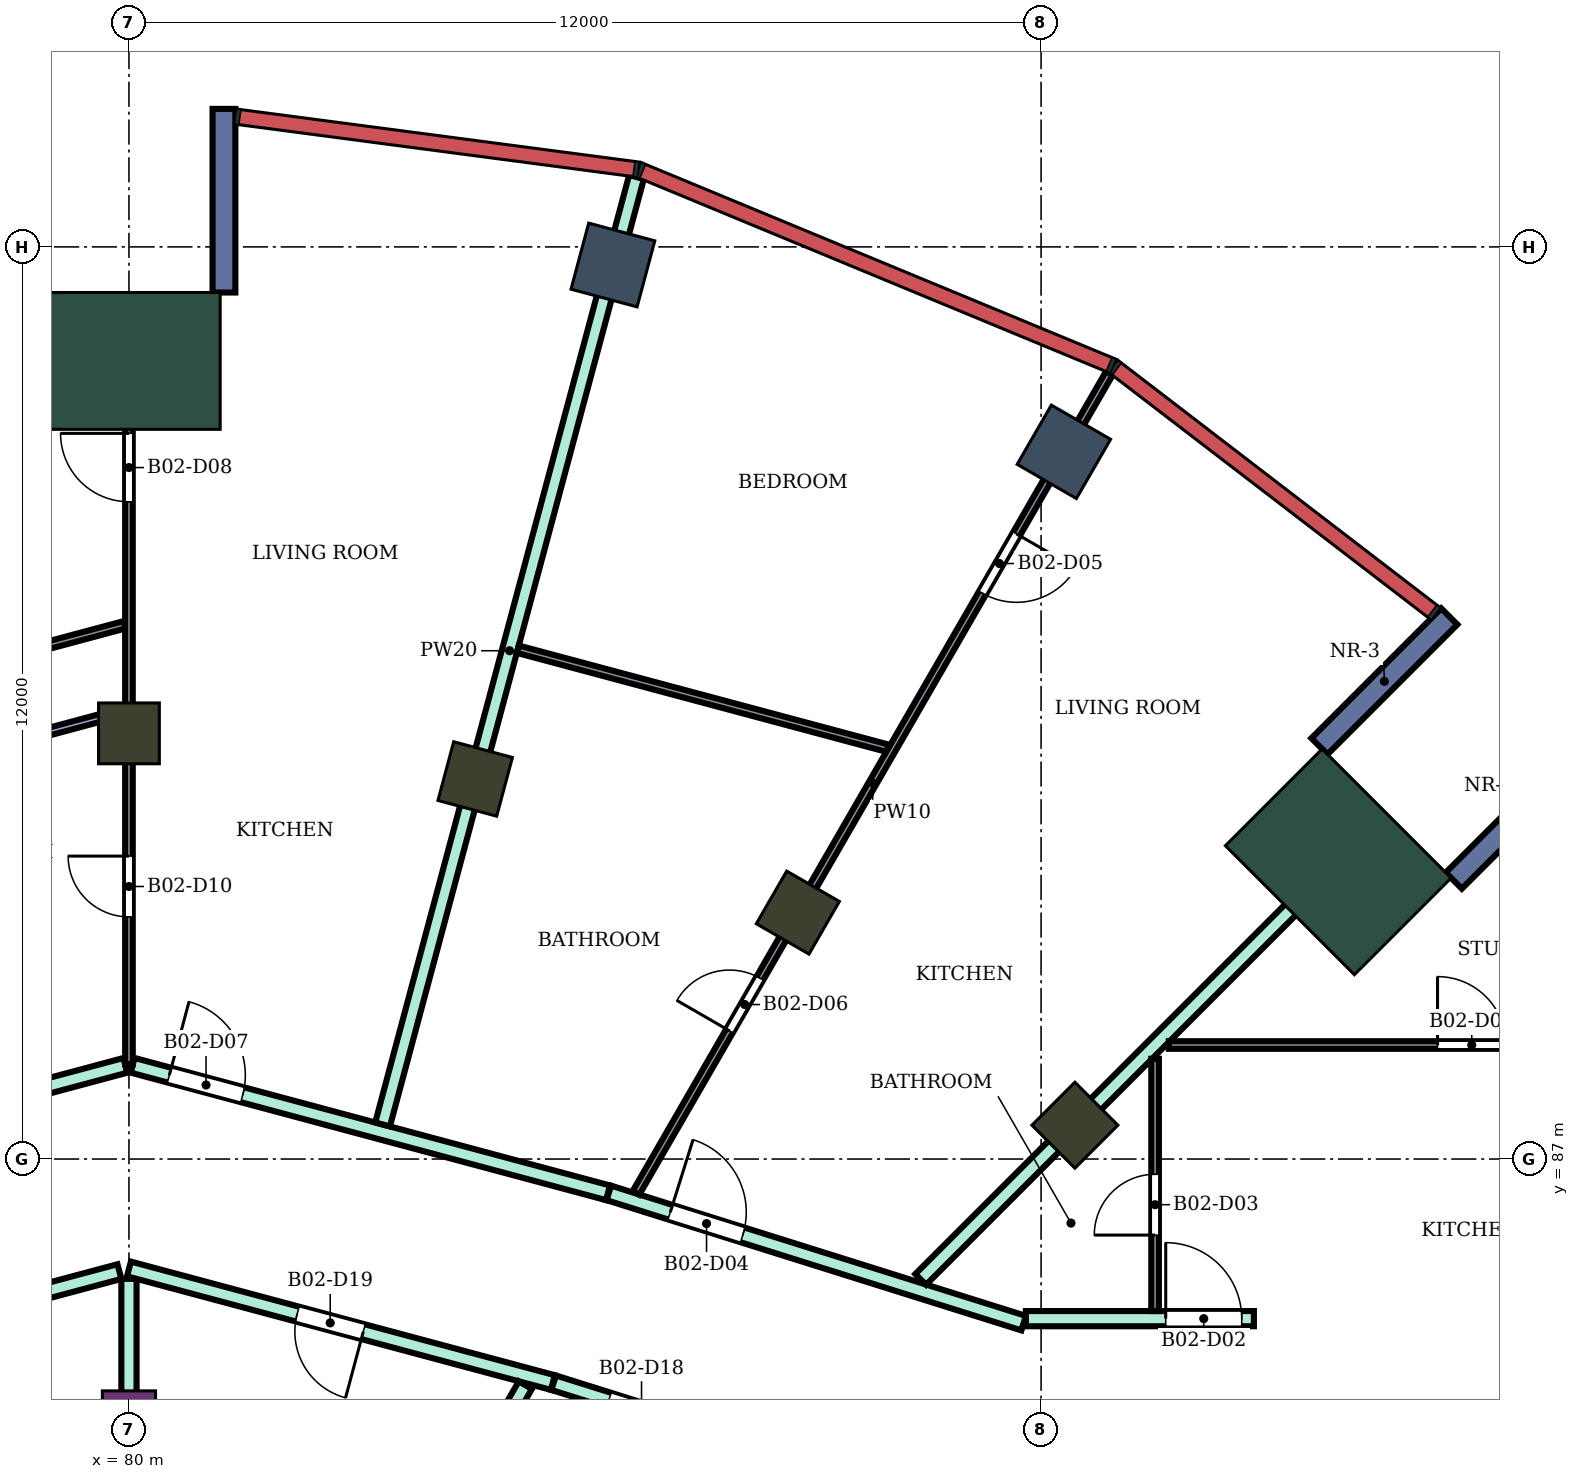
"""IFC4 building model, lengths in metres.
Left out: names, types, materials, properties, quantities, classifications, styles, units other than length and angle.
Written with IfcOpenShell. Run it as: python <this file> out.ifc"""

import sys

from ifc_helpers import new_model, si_unit, direction, frame, frame_2d, origin, origin_2d, place, context, subcontext, project, spatial, rectangle, extrude, element, fill, save


model = new_model("IFC4")
c1 = context("Model", 3, precision=1e-05, world=origin(), true_north=direction((0.0, 1.0)))
c2 = subcontext(c1, "Body", "Model", "MODEL_VIEW")
j1 = project(units=[si_unit("LENGTHUNIT", "METRE"), si_unit("PLANEANGLEUNIT", "RADIAN")], contexts=[c1])
p1 = place(None, origin())
s1 = spatial("IfcSite", under=j1, at=p1, CompositionType="ELEMENT")
p2 = place(p1, origin())
s2 = spatial("IfcBuilding", under=s1, at=p2, CompositionType="ELEMENT")
p3 = place(p2, frame((0.0, 0.0, 220.9)))
s3 = spatial("IfcBuildingStorey", under=s2, at=p3, CompositionType="ELEMENT", Elevation=220.9)
for number, where, z_axis, x_axis in (
    (1, (92.3, 96.304, 0.0), (0.0, 0.0, 1.0), (0.5, 0.866, 0.0)),
    (2, (86.367, 98.762, 0.0), (0.0, 0.0, 1.0), (0.259, 0.966, 0.0)),
):
    element("IfcColumn", number, at=place(p3, frame(where, z_axis=z_axis, x_axis=x_axis)), inside=s3, PredefinedType="COLUMN", context=c2, shape_type="SweptSolid", body=[
        extrude(rectangle(XDim=0.9, YDim=0.9, at=origin_2d()), origin(), (0.0, 0.0, 1.0), 4.2),
    ])
for number, where, z_axis, x_axis in (
    (3, (92.445, 87.445, 0.0), (0.0, 0.0, 1.0), (0.707, 0.707, 0.0)),
    (4, (88.8, 90.242, 0.0), (0.0, 0.0, 1.0), (0.5, 0.866, 0.0)),
    (5, (84.555, 92.0, 0.0), (0.0, 0.0, 1.0), (0.259, 0.966, 0.0)),
    (6, (80.0, 92.6, 0.0), (0.0, 0.0, 1.0), (0.0, 1.0, 0.0)),
):
    element("IfcColumn", number, at=place(p3, frame(where, z_axis=z_axis, x_axis=x_axis)), inside=s3, PredefinedType="COLUMN", context=c2, shape_type="SweptSolid", body=[
        extrude(rectangle(XDim=0.8, YDim=0.8, at=origin_2d()), origin(), (0.0, 0.0, 1.0), 4.2),
    ])
p4 = place(p3, frame((80.0, 83.6, 0.0), z_axis=(0.0, 0.0, 1.0), x_axis=(0.0, 1.0, 0.0)))
e7 = element("IfcColumn", 7, at=p4, inside=s3, PredefinedType="COLUMN", context=c2, shape_type="SweptSolid", body=[
    extrude(rectangle(XDim=0.7, YDim=0.7, at=origin_2d()), origin(), (0.0, 0.0, 1.0), 4.2),
])
for number, where, z_axis, x_axis in (
    (8, (95.91, 90.91, 0.0), (0.0, 0.0, 1.0), (0.707, 0.707, 0.0)),
    (9, (80.0, 97.5, 0.0), (0.0, 0.0, 1.0), (0.0, 1.0, 0.0)),
):
    element("IfcColumn", number, at=place(p3, frame(where, z_axis=z_axis, x_axis=x_axis)), inside=s3, PredefinedType="COLUMN", context=c2, shape_type="SweptSolid", body=[
        extrude(rectangle(XDim=1.8, YDim=2.4, at=origin_2d()), origin(), (0.0, 0.0, 1.0), 4.2),
    ])
for number, where, z_axis, x_axis in (
    (10, (97.43, 90.662, 0.0), (0.0, 0.0, 1.0), (0.707, 0.707, 0.0)),
    (11, (95.662, 92.43, 0.0), (0.0, 0.0, 1.0), (0.707, 0.707, 0.0)),
    (12, (81.25, 98.4, 0.0), (0.0, 0.0, 1.0), (0.0, 1.0, 0.0)),
):
    element("IfcWall", number, at=place(p3, frame(where, z_axis=z_axis, x_axis=x_axis)), inside=s3, PredefinedType="NOTDEFINED", context=c2, shape_type="SweptSolid", body=[
        extrude(rectangle(XDim=2.416, YDim=0.3, at=frame_2d((1.208, 0.0))), origin(), (0.0, 0.0, 1.0), 4.2),
    ])
p5 = place(p3, frame((73.687, 86.554, 0.0), z_axis=(0.0, 0.0, 1.0), x_axis=(0.96595258731, 0.258719150952, 0.0)))
e13 = element("IfcWall", 13, at=p5, inside=s3, PredefinedType="PARTITIONING", context=c2, shape_type="SweptSolid", body=[
    extrude(rectangle(XDim=6.486, YDim=0.2, at=frame_2d((3.243, 0.0))), origin(), (0.0, 0.0, 1.0), 3.75),
])
p6 = place(p5, frame((1.578, 0.0, 0.0)))
e14 = element("IfcOpeningElement", 14, at=p6, cuts=e13, PredefinedType="OPENING", context=c2, shape_type="SweptSolid", body=[
    extrude(rectangle(XDim=1.0, YDim=2.1, at=frame_2d((0.5, 1.05))), frame((0.0, 0.11, 0.0), z_axis=(0.0, -1.0, 0.0), x_axis=(1.0, 0.0, 0.0)), (0.0, 0.0, 1.0), 0.22),
])
p7 = place(p3, frame((74.413, 84.057, 0.0), z_axis=(0.0, 0.0, 1.0), x_axis=(0.965972135939, 0.258646153246, 0.0)))
e15 = element("IfcWall", 15, at=p7, inside=s3, PredefinedType="PARTITIONING", context=c2, shape_type="SweptSolid", body=[
    extrude(rectangle(XDim=5.654, YDim=0.2, at=frame_2d((2.827, 0.0))), origin(), (0.0, 0.0, 1.0), 3.75),
])
p8 = place(p7, frame((2.593, 0.0, 0.0)))
e16 = element("IfcOpeningElement", 16, at=p8, cuts=e15, PredefinedType="OPENING", context=c2, shape_type="SweptSolid", body=[
    extrude(rectangle(XDim=0.9, YDim=2.1, at=frame_2d((0.45, 1.05))), frame((0.0, 0.11, 0.0), z_axis=(0.0, -1.0, 0.0), x_axis=(1.0, 0.0, 0.0)), (0.0, 0.0, 1.0), 0.22),
])
p9 = place(p3, frame((80.0, 82.699, 0.0), z_axis=(0.0, 0.0, 1.0), x_axis=(0.0, 1.0, 0.0)))
e17 = element("IfcWall", 17, at=p9, inside=s3, PredefinedType="PARTITIONING", context=c2, shape_type="SweptSolid", body=[
    extrude(rectangle(XDim=2.725, YDim=0.2, at=frame_2d((1.363, 0.0))), origin(), (0.0, 0.0, 1.0), 3.75),
])
p10 = place(p3, frame((80.0, 85.554, 0.0), z_axis=(0.0, 0.0, 1.0), x_axis=(0.965928989968, -0.258807237802, 0.0)))
e18 = element("IfcWall", 18, at=p10, inside=s3, PredefinedType="PARTITIONING", context=c2, shape_type="SweptSolid", body=[
    extrude(rectangle(XDim=5.774, YDim=0.2, at=frame_2d((2.887, 0.0))), origin(), (0.0, 0.0, 1.0), 3.75),
])
p11 = place(p10, frame((2.292, 0.0, 0.0)))
e19 = element("IfcOpeningElement", 19, at=p11, cuts=e18, PredefinedType="OPENING", context=c2, shape_type="SweptSolid", body=[
    extrude(rectangle(XDim=0.9, YDim=2.1, at=frame_2d((0.45, 1.05))), frame((0.0, 0.11, 0.0), z_axis=(0.0, -1.0, 0.0), x_axis=(1.0, 0.0, 0.0)), (0.0, 0.0, 1.0), 0.22),
])
p12 = place(p3, frame((80.048, 88.233, 0.0), z_axis=(0.0, 0.0, 1.0), x_axis=(0.965865387308, -0.259044501198, 0.0)))
e20 = element("IfcWall", 20, at=p12, inside=s3, PredefinedType="PARTITIONING", context=c2, shape_type="SweptSolid", body=[
    extrude(rectangle(XDim=6.476, YDim=0.2, at=frame_2d((3.238, 0.0))), origin(), (0.0, 0.0, 1.0), 3.75),
])
p13 = place(p12, frame((0.5, 0.0, 0.0)))
e21 = element("IfcOpeningElement", 21, at=p13, cuts=e20, PredefinedType="OPENING", context=c2, shape_type="SweptSolid", body=[
    extrude(rectangle(XDim=1.0, YDim=2.1, at=frame_2d((0.5, 1.05))), frame((0.0, 0.11, 0.0), z_axis=(0.0, -1.0, 0.0), x_axis=(1.0, 0.0, 0.0)), (0.0, 0.0, 1.0), 0.22),
])
p14 = place(p3, frame((83.337, 87.455, 0.0), z_axis=(0.0, 0.0, 1.0), x_axis=(0.258878883978, 0.965909790524, 0.0)))
e22 = element("IfcWall", 22, at=p14, inside=s3, PredefinedType="PARTITIONING", context=c2, shape_type="SweptSolid", body=[
    extrude(rectangle(XDim=12.904, YDim=0.2, at=frame_2d((6.452, 0.0))), origin(), (0.0, 0.0, 1.0), 3.75),
])
p15 = place(p3, frame((83.852, 81.665, 0.0), z_axis=(0.0, 0.0, 1.0), x_axis=(0.500146274735, 0.865940935554, 0.0)))
e23 = element("IfcWall", 23, at=p15, inside=s3, PredefinedType="PARTITIONING", context=c2, shape_type="SweptSolid", body=[
    extrude(rectangle(XDim=2.726, YDim=0.2, at=frame_2d((1.363, 0.0))), origin(), (0.0, 0.0, 1.0), 3.75),
])
p16 = place(p3, frame((85.587, 84.057, 0.0), z_axis=(0.0, 0.0, 1.0), x_axis=(0.954239513179, -0.299043393987, 0.0)))
e24 = element("IfcWall", 24, at=p16, inside=s3, PredefinedType="PARTITIONING", context=c2, shape_type="SweptSolid", body=[
    extrude(rectangle(XDim=2.424, YDim=0.2, at=frame_2d((1.212, 0.0))), origin(), (0.0, 0.0, 1.0), 3.75),
])
p17 = place(p16, frame((0.762, 0.0, 0.0)))
e25 = element("IfcOpeningElement", 25, at=p17, cuts=e24, PredefinedType="OPENING", context=c2, shape_type="SweptSolid", body=[
    extrude(rectangle(XDim=0.9, YDim=2.1, at=frame_2d((0.45, 1.05))), frame((0.0, 0.11, 0.0), z_axis=(0.0, -1.0, 0.0), x_axis=(1.0, 0.0, 0.0)), (0.0, 0.0, 1.0), 0.22),
])
p18 = place(p3, frame((86.313, 86.554, 0.0), z_axis=(0.0, 0.0, 1.0), x_axis=(0.954081217458, -0.299548043717, 0.0)))
e26 = element("IfcWall", 26, at=p18, inside=s3, PredefinedType="PARTITIONING", context=c2, shape_type="SweptSolid", body=[
    extrude(rectangle(XDim=5.721, YDim=0.2, at=frame_2d((2.86, 0.0))), origin(), (0.0, 0.0, 1.0), 3.75),
])
p19 = place(p18, frame((0.848, 0.0, 0.0)))
e27 = element("IfcOpeningElement", 27, at=p19, cuts=e26, PredefinedType="OPENING", context=c2, shape_type="SweptSolid", body=[
    extrude(rectangle(XDim=1.0, YDim=2.1, at=frame_2d((0.5, 1.05))), frame((0.0, 0.11, 0.0), z_axis=(0.0, -1.0, 0.0), x_axis=(1.0, 0.0, 0.0)), (0.0, 0.0, 1.0), 0.22),
])
p20 = place(p3, frame((90.416, 85.416, 0.0), z_axis=(0.0, 0.0, 1.0), x_axis=(0.707222076599, 0.706991466971, 0.0)))
e28 = element("IfcWall", 28, at=p20, inside=s3, PredefinedType="PARTITIONING", context=c2, shape_type="SweptSolid", body=[
    extrude(rectangle(XDim=8.469, YDim=0.2, at=frame_2d((4.235, 0.0))), origin(), (0.0, 0.0, 1.0), 3.75),
])
p21 = place(p3, frame((91.8, 84.9, 0.0), z_axis=(0.0, 0.0, 1.0), x_axis=(1.0, 0.0, 0.0)))
e29 = element("IfcWall", 29, at=p21, inside=s3, PredefinedType="PARTITIONING", context=c2, shape_type="SweptSolid", body=[
    extrude(rectangle(XDim=3.0, YDim=0.2, at=frame_2d((1.5, 0.0))), origin(), (0.0, 0.0, 1.0), 3.75),
])
p22 = place(p21, frame((1.84, 0.0, 0.0)))
e30 = element("IfcOpeningElement", 30, at=p22, cuts=e29, PredefinedType="OPENING", context=c2, shape_type="SweptSolid", body=[
    extrude(rectangle(XDim=1.0, YDim=2.1, at=frame_2d((0.5, 1.05))), frame((0.0, 0.11, 0.0), z_axis=(0.0, -1.0, 0.0), x_axis=(1.0, 0.0, 0.0)), (0.0, 0.0, 1.0), 0.22),
])
p23 = place(p3, frame((75.337, 92.793, 0.0), z_axis=(0.0, 0.0, 1.0), x_axis=(0.965840336715, 0.259137886026, 0.0)))
e31 = element("IfcWall", 31, at=p23, inside=s3, PredefinedType="PARTITIONING", context=c2, shape_type="SweptSolid", body=[
    extrude(rectangle(XDim=4.768, YDim=0.1, at=frame_2d((2.384, 0.0))), origin(), (0.0, 0.0, 1.0), 3.75),
])
p24 = place(p23, frame((1.964, 0.0, 0.0)))
e32 = element("IfcOpeningElement", 32, at=p24, cuts=e31, PredefinedType="OPENING", context=c2, shape_type="SweptSolid", body=[
    extrude(rectangle(XDim=0.8, YDim=2.1, at=frame_2d((0.4, 1.05))), frame((0.0, 0.06, 0.0), z_axis=(0.0, -1.0, 0.0), x_axis=(1.0, 0.0, 0.0)), (0.0, 0.0, 1.0), 0.12),
])
p25 = place(p3, frame((76.13, 91.867, 0.0), z_axis=(0.0, 0.0, 1.0), x_axis=(0.965860204905, 0.259063823373, 0.0)))
e33 = element("IfcWall", 33, at=p25, inside=s3, PredefinedType="PARTITIONING", context=c2, shape_type="SweptSolid", body=[
    extrude(rectangle(XDim=3.947, YDim=0.1, at=frame_2d((1.973, 0.0))), origin(), (0.0, 0.0, 1.0), 3.38),
])
p26 = place(p3, frame((80.0, 88.246, 0.0), z_axis=(0.0, 0.0, 1.0), x_axis=(0.0, 1.0, 0.0)))
e34 = element("IfcWall", 34, at=p26, inside=s3, PredefinedType="PARTITIONING", context=c2, shape_type="SweptSolid", body=[
    extrude(rectangle(XDim=9.954, YDim=0.1, at=frame_2d((4.977, 0.0))), origin(), (0.0, 0.0, 1.0), 3.75),
])
p27 = place(p26, frame((7.401, 0.0, 0.0)))
e35 = element("IfcOpeningElement", 35, at=p27, cuts=e34, PredefinedType="OPENING", context=c2, shape_type="SweptSolid", body=[
    extrude(rectangle(XDim=0.9, YDim=2.1, at=frame_2d((0.45, 1.05))), frame((0.0, 0.06, 0.0), z_axis=(0.0, -1.0, 0.0), x_axis=(1.0, 0.0, 0.0)), (0.0, 0.0, 1.0), 0.12),
])
p28 = place(p26, frame((1.939, 0.0, 0.0)))
e36 = element("IfcOpeningElement", 36, at=p28, cuts=e34, PredefinedType="OPENING", context=c2, shape_type="SweptSolid", body=[
    extrude(rectangle(XDim=0.8, YDim=2.1, at=frame_2d((0.4, 1.05))), frame((0.0, 0.06, 0.0), z_axis=(0.0, -1.0, 0.0), x_axis=(1.0, 0.0, 0.0)), (0.0, 0.0, 1.0), 0.12),
])
p29 = place(p3, frame((85.115, 93.707, 0.0), z_axis=(0.0, 0.0, 1.0), x_axis=(0.965985898153, -0.258594749694, 0.0)))
e37 = element("IfcWall", 37, at=p29, inside=s3, PredefinedType="PARTITIONING", context=c2, shape_type="SweptSolid", body=[
    extrude(rectangle(XDim=5.037, YDim=0.1, at=frame_2d((2.519, 0.0))), origin(), (0.0, 0.0, 1.0), 3.75),
])
p30 = place(p3, frame((86.671, 86.554, 0.0), z_axis=(0.0, 0.0, 1.0), x_axis=(0.500104188531, 0.865965242151, 0.0)))
e38 = element("IfcWall", 38, at=p30, inside=s3, PredefinedType="PARTITIONING", context=c2, shape_type="SweptSolid", body=[
    extrude(rectangle(XDim=12.456, YDim=0.1, at=frame_2d((6.228, 0.0))), origin(), (0.0, 0.0, 1.0), 3.75),
])
p31 = place(p30, frame((9.111, 0.0, 0.0)))
e39 = element("IfcOpeningElement", 39, at=p31, cuts=e38, PredefinedType="OPENING", context=c2, shape_type="SweptSolid", body=[
    extrude(rectangle(XDim=0.9, YDim=2.1, at=frame_2d((0.45, 1.05))), frame((0.0, 0.06, 0.0), z_axis=(0.0, -1.0, 0.0), x_axis=(1.0, 0.0, 0.0)), (0.0, 0.0, 1.0), 0.12),
])
p32 = place(p30, frame((2.462, 0.0, 0.0)))
e40 = element("IfcOpeningElement", 40, at=p32, cuts=e38, PredefinedType="OPENING", context=c2, shape_type="SweptSolid", body=[
    extrude(rectangle(XDim=0.8, YDim=2.1, at=frame_2d((0.4, 1.05))), frame((0.0, 0.06, 0.0), z_axis=(0.0, -1.0, 0.0), x_axis=(1.0, 0.0, 0.0)), (0.0, 0.0, 1.0), 0.12),
])
p33 = place(p3, frame((93.5, 85.0, 0.0), z_axis=(0.0, 0.0, 1.0), x_axis=(0.0, 1.0, 0.0)))
e41 = element("IfcWall", 41, at=p33, inside=s3, PredefinedType="PARTITIONING", context=c2, shape_type="SweptSolid", body=[
    extrude(rectangle(XDim=3.319, YDim=0.1, at=frame_2d((1.66, 0.0))), origin(), (0.0, 0.0, 1.0), 3.75),
])
p34 = place(p33, frame((1.0, 0.0, 0.0)))
e42 = element("IfcOpeningElement", 42, at=p34, cuts=e41, PredefinedType="OPENING", context=c2, shape_type="SweptSolid", body=[
    extrude(rectangle(XDim=0.8, YDim=2.1, at=frame_2d((0.4, 1.05))), frame((0.0, 0.06, 0.0), z_axis=(0.0, -1.0, 0.0), x_axis=(1.0, 0.0, 0.0)), (0.0, 0.0, 1.0), 0.12),
])
p35 = place(p3, frame((93.681, 88.5, 0.0), z_axis=(0.0, 0.0, 1.0), x_axis=(1.0, 0.0, 0.0)))
e43 = element("IfcWall", 43, at=p35, inside=s3, PredefinedType="PARTITIONING", context=c2, shape_type="SweptSolid", body=[
    extrude(rectangle(XDim=8.247, YDim=0.1, at=frame_2d((4.124, 0.0))), origin(), (0.0, 0.0, 1.0), 3.75),
])
p36 = place(p35, frame((3.535, 0.0, 0.0)))
e44 = element("IfcOpeningElement", 44, at=p36, cuts=e43, PredefinedType="OPENING", context=c2, shape_type="SweptSolid", body=[
    extrude(rectangle(XDim=0.9, YDim=2.1, at=frame_2d((0.45, 1.05))), frame((0.0, 0.06, 0.0), z_axis=(0.0, -1.0, 0.0), x_axis=(1.0, 0.0, 0.0)), (0.0, 0.0, 1.0), 0.12),
])
p37 = place(p36, origin())
e45 = element("IfcDoor", 45, at=p37, inside=s3, OperationType="SINGLE_SWING_LEFT", PredefinedType="DOOR", context=c2, shape_type="SweptSolid", body=[
    extrude(rectangle(XDim=0.9, YDim=2.1, at=frame_2d((0.45, 1.05))), frame((0.0, 0.025, 0.0), z_axis=(0.0, -1.0, 0.0), x_axis=(1.0, 0.0, 0.0)), (0.0, 0.0, 1.0), 0.05),
])
fill(e44, e45)
p38 = place(p22, origin())
e46 = element("IfcDoor", 46, at=p38, inside=s3, OperationType="SINGLE_SWING_LEFT", PredefinedType="DOOR", context=c2, shape_type="SweptSolid", body=[
    extrude(rectangle(XDim=1.0, YDim=2.1, at=frame_2d((0.5, 1.05))), frame((0.0, 0.025, 0.0), z_axis=(0.0, -1.0, 0.0), x_axis=(1.0, 0.0, 0.0)), (0.0, 0.0, 1.0), 0.05),
])
fill(e30, e46)
p39 = place(p34, origin())
e47 = element("IfcDoor", 47, at=p39, inside=s3, OperationType="SINGLE_SWING_LEFT", PredefinedType="DOOR", context=c2, shape_type="SweptSolid", body=[
    extrude(rectangle(XDim=0.8, YDim=2.1, at=frame_2d((0.4, 1.05))), frame((0.0, 0.025, 0.0), z_axis=(0.0, -1.0, 0.0), x_axis=(1.0, 0.0, 0.0)), (0.0, 0.0, 1.0), 0.05),
])
fill(e42, e47)
p40 = place(p19, origin())
e48 = element("IfcDoor", 48, at=p40, inside=s3, OperationType="SINGLE_SWING_LEFT", PredefinedType="DOOR", context=c2, shape_type="SweptSolid", body=[
    extrude(rectangle(XDim=1.0, YDim=2.1, at=frame_2d((0.5, 1.05))), frame((0.0, 0.025, 0.0), z_axis=(0.0, -1.0, 0.0), x_axis=(1.0, 0.0, 0.0)), (0.0, 0.0, 1.0), 0.05),
])
fill(e27, e48)
p41 = place(p31, frame((0.9, 0.0, 0.0), z_axis=(0.0, 0.0, 1.0), x_axis=(-1.0, 0.0, 0.0)))
e49 = element("IfcDoor", 49, at=p41, inside=s3, OperationType="SINGLE_SWING_LEFT", PredefinedType="DOOR", context=c2, shape_type="SweptSolid", body=[
    extrude(rectangle(XDim=0.9, YDim=2.1, at=frame_2d((0.45, 1.05))), frame((0.0, 0.025, 0.0), z_axis=(0.0, -1.0, 0.0), x_axis=(1.0, 0.0, 0.0)), (0.0, 0.0, 1.0), 0.05),
])
fill(e39, e49)
p42 = place(p32, origin())
e50 = element("IfcDoor", 50, at=p42, inside=s3, OperationType="SINGLE_SWING_LEFT", PredefinedType="DOOR", context=c2, shape_type="SweptSolid", body=[
    extrude(rectangle(XDim=0.8, YDim=2.1, at=frame_2d((0.4, 1.05))), frame((0.0, 0.025, 0.0), z_axis=(0.0, -1.0, 0.0), x_axis=(1.0, 0.0, 0.0)), (0.0, 0.0, 1.0), 0.05),
])
fill(e40, e50)
p43 = place(p13, origin())
e51 = element("IfcDoor", 51, at=p43, inside=s3, OperationType="SINGLE_SWING_LEFT", PredefinedType="DOOR", context=c2, shape_type="SweptSolid", body=[
    extrude(rectangle(XDim=1.0, YDim=2.1, at=frame_2d((0.5, 1.05))), frame((0.0, 0.025, 0.0), z_axis=(0.0, -1.0, 0.0), x_axis=(1.0, 0.0, 0.0)), (0.0, 0.0, 1.0), 0.05),
])
fill(e21, e51)
p44 = place(p27, origin())
e52 = element("IfcDoor", 52, at=p44, inside=s3, OperationType="SINGLE_SWING_RIGHT", PredefinedType="DOOR", context=c2, shape_type="SweptSolid", body=[
    extrude(rectangle(XDim=0.9, YDim=2.1, at=frame_2d((0.45, 1.05))), frame((0.0, 0.025, 0.0), z_axis=(0.0, -1.0, 0.0), x_axis=(1.0, 0.0, 0.0)), (0.0, 0.0, 1.0), 0.05),
])
fill(e35, e52)
p45 = place(p28, origin())
e53 = element("IfcDoor", 53, at=p45, inside=s3, OperationType="SINGLE_SWING_RIGHT", PredefinedType="DOOR", context=c2, shape_type="SweptSolid", body=[
    extrude(rectangle(XDim=0.8, YDim=2.1, at=frame_2d((0.4, 1.05))), frame((0.0, 0.025, 0.0), z_axis=(0.0, -1.0, 0.0), x_axis=(1.0, 0.0, 0.0)), (0.0, 0.0, 1.0), 0.05),
])
fill(e36, e53)
p46 = place(p17, frame((0.9, 0.0, 0.0), z_axis=(0.0, 0.0, 1.0), x_axis=(-1.0, 0.0, 0.0)))
e54 = element("IfcDoor", 54, at=p46, inside=s3, OperationType="SINGLE_SWING_LEFT", PredefinedType="DOOR", context=c2, shape_type="SweptSolid", body=[
    extrude(rectangle(XDim=0.9, YDim=2.1, at=frame_2d((0.45, 1.05))), frame((0.0, 0.025, 0.0), z_axis=(0.0, -1.0, 0.0), x_axis=(1.0, 0.0, 0.0)), (0.0, 0.0, 1.0), 0.05),
])
fill(e25, e54)
p47 = place(p11, frame((0.9, 0.0, 0.0), z_axis=(0.0, 0.0, 1.0), x_axis=(-1.0, 0.0, 0.0)))
e55 = element("IfcDoor", 55, at=p47, inside=s3, OperationType="SINGLE_SWING_LEFT", PredefinedType="DOOR", context=c2, shape_type="SweptSolid", body=[
    extrude(rectangle(XDim=0.9, YDim=2.1, at=frame_2d((0.45, 1.05))), frame((0.0, 0.025, 0.0), z_axis=(0.0, -1.0, 0.0), x_axis=(1.0, 0.0, 0.0)), (0.0, 0.0, 1.0), 0.05),
])
fill(e19, e55)
save(model, sys.argv[1])
